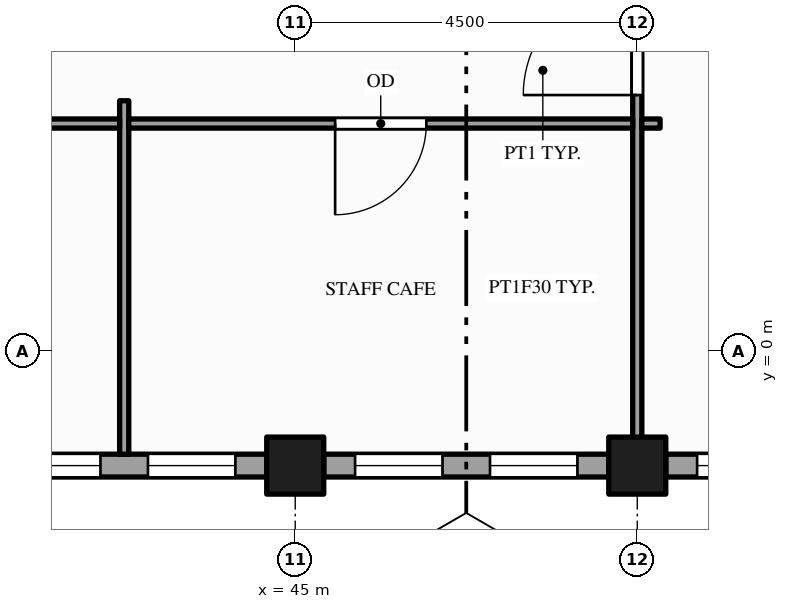
"""IFC4 building model, lengths in metres.
Left out: names, types, materials, properties, quantities, classifications, styles, units other than length and angle.
Written with IfcOpenShell. Run it as: python <this file> out.ifc"""

import sys

from ifc_helpers import new_model, si_unit, direction, frame, frame_2d, origin, origin_2d, place, context, subcontext, project, spatial, rectangle, hollow_rectangle, extrude, element, fill, save


model = new_model("IFC4")
c1 = context("Model", 3, precision=1e-05, world=origin(), true_north=direction((0.0, 1.0)))
c2 = subcontext(c1, "Body", "Model", "MODEL_VIEW")
j1 = project(units=[si_unit("LENGTHUNIT", "METRE"), si_unit("PLANEANGLEUNIT", "RADIAN")], contexts=[c1])
p1 = place(None, origin())
s1 = spatial("IfcSite", under=j1, at=p1, CompositionType="ELEMENT")
p2 = place(p1, origin())
s2 = spatial("IfcBuilding", under=s1, at=p2, CompositionType="ELEMENT")
p3 = place(p2, frame((0.0, 0.0, 215.0)))
s3 = spatial("IfcBuildingStorey", under=s2, at=p3, CompositionType="ELEMENT", Elevation=215.0)
for number, where, z_axis, x_axis in (
    (1, (45.0, -1.5, -0.15), (0.0, 0.0, 1.0), (1.0, 0.0, 0.0)),
    (2, (49.5, -1.5, -0.15), (0.0, 0.0, 1.0), (1.0, 0.0, 0.0)),
):
    element("IfcColumn", number, at=place(p3, frame(where, z_axis=z_axis, x_axis=x_axis)), inside=s3, PredefinedType="COLUMN", context=c2, shape_type="SweptSolid", body=[
        extrude(hollow_rectangle(XDim=0.75, YDim=0.75, WallThickness=0.036, at=origin_2d()), origin(), (0.0, 0.0, 1.0), 4.0),
    ])
p4 = place(p3, frame((40.875, -1.5, 0.0), z_axis=(0.0, 0.0, 1.0), x_axis=(1.0, 0.0, 0.0)))
e3 = element("IfcWall", 3, at=p4, inside=s3, PredefinedType="STANDARD", context=c2, shape_type="SweptSolid", body=[
    extrude(rectangle(XDim=3.75, YDim=0.3, at=frame_2d((1.875, 0.0))), origin(), (0.0, 0.0, 1.0), 2.87),
])
p5 = place(p4, frame((0.413, 0.0, 0.9)))
e4 = element("IfcOpeningElement", 4, at=p5, cuts=e3, PredefinedType="OPENING", context=c2, shape_type="SweptSolid", body=[
    extrude(rectangle(XDim=1.15, YDim=1.75, at=frame_2d((0.575, 0.875))), frame((0.0, 0.16, 0.0), z_axis=(0.0, -1.0, 0.0), x_axis=(1.0, 0.0, 0.0)), (0.0, 0.0, 1.0), 0.32),
])
p6 = place(p4, frame((2.188, 0.0, 0.9)))
e5 = element("IfcOpeningElement", 5, at=p6, cuts=e3, PredefinedType="OPENING", context=c2, shape_type="SweptSolid", body=[
    extrude(rectangle(XDim=1.15, YDim=1.75, at=frame_2d((0.575, 0.875))), frame((0.0, 0.16, 0.0), z_axis=(0.0, -1.0, 0.0), x_axis=(1.0, 0.0, 0.0)), (0.0, 0.0, 1.0), 0.32),
])
p7 = place(p3, frame((45.375, -1.5, 0.0), z_axis=(0.0, 0.0, 1.0), x_axis=(1.0, 0.0, 0.0)))
e6 = element("IfcWall", 6, at=p7, inside=s3, PredefinedType="STANDARD", context=c2, shape_type="SweptSolid", body=[
    extrude(rectangle(XDim=3.75, YDim=0.3, at=frame_2d((1.875, 0.0))), origin(), (0.0, 0.0, 1.0), 2.87),
])
p8 = place(p7, frame((0.413, 0.0, 0.9)))
e7 = element("IfcOpeningElement", 7, at=p8, cuts=e6, PredefinedType="OPENING", context=c2, shape_type="SweptSolid", body=[
    extrude(rectangle(XDim=1.15, YDim=1.75, at=frame_2d((0.575, 0.875))), frame((0.0, 0.16, 0.0), z_axis=(0.0, -1.0, 0.0), x_axis=(1.0, 0.0, 0.0)), (0.0, 0.0, 1.0), 0.32),
])
p9 = place(p7, frame((2.188, 0.0, 0.9)))
e8 = element("IfcOpeningElement", 8, at=p9, cuts=e6, PredefinedType="OPENING", context=c2, shape_type="SweptSolid", body=[
    extrude(rectangle(XDim=1.15, YDim=1.75, at=frame_2d((0.575, 0.875))), frame((0.0, 0.16, 0.0), z_axis=(0.0, -1.0, 0.0), x_axis=(1.0, 0.0, 0.0)), (0.0, 0.0, 1.0), 0.32),
])
p10 = place(p3, frame((49.875, -1.5, 0.0), z_axis=(0.0, 0.0, 1.0), x_axis=(1.0, 0.0, 0.0)))
e9 = element("IfcWall", 9, at=p10, inside=s3, PredefinedType="STANDARD", context=c2, shape_type="SweptSolid", body=[
    extrude(rectangle(XDim=3.75, YDim=0.3, at=frame_2d((1.875, 0.0))), origin(), (0.0, 0.0, 1.0), 2.87),
])
p11 = place(p10, frame((0.413, 0.0, 0.9)))
e10 = element("IfcOpeningElement", 10, at=p11, cuts=e9, PredefinedType="OPENING", context=c2, shape_type="SweptSolid", body=[
    extrude(rectangle(XDim=1.15, YDim=1.75, at=frame_2d((0.575, 0.875))), frame((0.0, 0.16, 0.0), z_axis=(0.0, -1.0, 0.0), x_axis=(1.0, 0.0, 0.0)), (0.0, 0.0, 1.0), 0.32),
])
p12 = place(p10, frame((2.188, 0.0, 0.9)))
e11 = element("IfcOpeningElement", 11, at=p12, cuts=e9, PredefinedType="OPENING", context=c2, shape_type="SweptSolid", body=[
    extrude(rectangle(XDim=1.15, YDim=1.75, at=frame_2d((0.575, 0.875))), frame((0.0, 0.16, 0.0), z_axis=(0.0, -1.0, 0.0), x_axis=(1.0, 0.0, 0.0)), (0.0, 0.0, 1.0), 0.32),
])
p13 = place(p3, frame((42.75, -1.35, 0.0), z_axis=(0.0, 0.0, 1.0), x_axis=(0.0, 1.0, 0.0)))
e12 = element("IfcWall", 12, at=p13, inside=s3, PredefinedType="PARTITIONING", context=c2, shape_type="SweptSolid", body=[
    extrude(rectangle(XDim=4.65, YDim=0.12, at=frame_2d((2.325, 0.0))), origin(), (0.0, 0.0, 1.0), 2.87),
])
p14 = place(p3, frame((49.5, -1.35, 0.0), z_axis=(0.0, 0.0, 1.0), x_axis=(0.0, 1.0, 0.0)))
e13 = element("IfcWall", 13, at=p14, inside=s3, PredefinedType="PARTITIONING", context=c2, shape_type="SweptSolid", body=[
    extrude(rectangle(XDim=22.2, YDim=0.12, at=frame_2d((11.1, 0.0))), origin(), (0.0, 0.0, 1.0), 2.87),
])
p15 = place(p14, frame((4.725, 0.0, 0.0)))
e14 = element("IfcOpeningElement", 14, at=p15, cuts=e13, PredefinedType="OPENING", context=c2, shape_type="SweptSolid", body=[
    extrude(rectangle(XDim=1.5, YDim=2.1, at=frame_2d((0.75, 1.05))), frame((0.0, 0.07, 0.0), z_axis=(0.0, -1.0, 0.0), x_axis=(1.0, 0.0, 0.0)), (0.0, 0.0, 1.0), 0.14),
])
p16 = place(p14, frame((15.975, 0.0, 0.0)))
e15 = element("IfcOpeningElement", 15, at=p16, cuts=e13, PredefinedType="OPENING", context=c2, shape_type="SweptSolid", body=[
    extrude(rectangle(XDim=1.5, YDim=2.1, at=frame_2d((0.75, 1.05))), frame((0.0, 0.07, 0.0), z_axis=(0.0, -1.0, 0.0), x_axis=(1.0, 0.0, 0.0)), (0.0, 0.0, 1.0), 0.14),
])
p17 = place(p14, frame((7.6, 0.0, 0.0)))
e16 = element("IfcOpeningElement", 16, at=p17, cuts=e13, PredefinedType="OPENING", context=c2, shape_type="SweptSolid", body=[
    extrude(rectangle(XDim=0.9, YDim=2.1, at=frame_2d((0.45, 1.05))), frame((0.0, 0.07, 0.0), z_axis=(0.0, -1.0, 0.0), x_axis=(1.0, 0.0, 0.0)), (0.0, 0.0, 1.0), 0.14),
])
p18 = place(p14, frame((10.65, 0.0, 0.0)))
e17 = element("IfcOpeningElement", 17, at=p18, cuts=e13, PredefinedType="OPENING", context=c2, shape_type="SweptSolid", body=[
    extrude(rectangle(XDim=0.9, YDim=2.1, at=frame_2d((0.45, 1.05))), frame((0.0, 0.07, 0.0), z_axis=(0.0, -1.0, 0.0), x_axis=(1.0, 0.0, 0.0)), (0.0, 0.0, 1.0), 0.14),
])
p19 = place(p14, frame((13.6, 0.0, 0.0)))
e18 = element("IfcOpeningElement", 18, at=p19, cuts=e13, PredefinedType="OPENING", context=c2, shape_type="SweptSolid", body=[
    extrude(rectangle(XDim=1.0, YDim=2.1, at=frame_2d((0.5, 1.05))), frame((0.0, 0.07, 0.0), z_axis=(0.0, -1.0, 0.0), x_axis=(1.0, 0.0, 0.0)), (0.0, 0.0, 1.0), 0.14),
])
p20 = place(p3, frame((38.31, 3.0, 0.0), z_axis=(0.0, 0.0, 1.0), x_axis=(1.0, 0.0, 0.0)))
e19 = element("IfcWall", 19, at=p20, inside=s3, PredefinedType="PARTITIONING", context=c2, shape_type="SweptSolid", body=[
    extrude(rectangle(XDim=4.38, YDim=0.12, at=frame_2d((2.19, 0.0))), origin(), (0.0, 0.0, 1.0), 2.87),
])
p21 = place(p20, frame((1.69, 0.0, 0.0)))
e20 = element("IfcOpeningElement", 20, at=p21, cuts=e19, PredefinedType="OPENING", context=c2, shape_type="SweptSolid", body=[
    extrude(rectangle(XDim=1.0, YDim=2.1, at=frame_2d((0.5, 1.05))), frame((0.0, 0.07, 0.0), z_axis=(0.0, -1.0, 0.0), x_axis=(1.0, 0.0, 0.0)), (0.0, 0.0, 1.0), 0.14),
])
p22 = place(p3, frame((42.81, 3.0, 0.0), z_axis=(0.0, 0.0, 1.0), x_axis=(1.0, 0.0, 0.0)))
e21 = element("IfcWall", 21, at=p22, inside=s3, PredefinedType="PARTITIONING", context=c2, shape_type="SweptSolid", body=[
    extrude(rectangle(XDim=6.63, YDim=0.12, at=frame_2d((3.315, 0.0))), origin(), (0.0, 0.0, 1.0), 2.87),
])
p23 = place(p22, frame((2.715, 0.0, 0.0)))
e22 = element("IfcOpeningElement", 22, at=p23, cuts=e21, PredefinedType="OPENING", context=c2, shape_type="SweptSolid", body=[
    extrude(rectangle(XDim=1.2, YDim=2.1, at=frame_2d((0.6, 1.05))), frame((0.0, 0.07, 0.0), z_axis=(0.0, -1.0, 0.0), x_axis=(1.0, 0.0, 0.0)), (0.0, 0.0, 1.0), 0.14),
])
p24 = place(p3, frame((49.56, 3.0, 0.0), z_axis=(0.0, 0.0, 1.0), x_axis=(1.0, 0.0, 0.0)))
e23 = element("IfcWall", 23, at=p24, inside=s3, PredefinedType="PARTITIONING", context=c2, shape_type="SweptSolid", body=[
    extrude(rectangle(XDim=0.24, YDim=0.12, at=frame_2d((0.12, 0.0))), origin(), (0.0, 0.0, 1.0), 2.87),
])
p25 = place(p5, origin())
e24 = element("IfcWindow", 24, at=p25, inside=s3, PartitioningType="SINGLE_PANEL", PredefinedType="WINDOW", context=c2, shape_type="SweptSolid", body=[
    extrude(rectangle(XDim=1.15, YDim=1.75, at=frame_2d((0.575, 0.875))), frame((0.0, 0.03, 0.0), z_axis=(0.0, -1.0, 0.0), x_axis=(1.0, 0.0, 0.0)), (0.0, 0.0, 1.0), 0.06),
])
fill(e4, e24)
p26 = place(p6, origin())
e25 = element("IfcWindow", 25, at=p26, inside=s3, PartitioningType="SINGLE_PANEL", PredefinedType="WINDOW", context=c2, shape_type="SweptSolid", body=[
    extrude(rectangle(XDim=1.15, YDim=1.75, at=frame_2d((0.575, 0.875))), frame((0.0, 0.03, 0.0), z_axis=(0.0, -1.0, 0.0), x_axis=(1.0, 0.0, 0.0)), (0.0, 0.0, 1.0), 0.06),
])
fill(e5, e25)
p27 = place(p8, origin())
e26 = element("IfcWindow", 26, at=p27, inside=s3, PartitioningType="SINGLE_PANEL", PredefinedType="WINDOW", context=c2, shape_type="SweptSolid", body=[
    extrude(rectangle(XDim=1.15, YDim=1.75, at=frame_2d((0.575, 0.875))), frame((0.0, 0.03, 0.0), z_axis=(0.0, -1.0, 0.0), x_axis=(1.0, 0.0, 0.0)), (0.0, 0.0, 1.0), 0.06),
])
fill(e7, e26)
p28 = place(p9, origin())
e27 = element("IfcWindow", 27, at=p28, inside=s3, PartitioningType="SINGLE_PANEL", PredefinedType="WINDOW", context=c2, shape_type="SweptSolid", body=[
    extrude(rectangle(XDim=1.15, YDim=1.75, at=frame_2d((0.575, 0.875))), frame((0.0, 0.03, 0.0), z_axis=(0.0, -1.0, 0.0), x_axis=(1.0, 0.0, 0.0)), (0.0, 0.0, 1.0), 0.06),
])
fill(e8, e27)
p29 = place(p11, origin())
e28 = element("IfcWindow", 28, at=p29, inside=s3, PartitioningType="SINGLE_PANEL", PredefinedType="WINDOW", context=c2, shape_type="SweptSolid", body=[
    extrude(rectangle(XDim=1.15, YDim=1.75, at=frame_2d((0.575, 0.875))), frame((0.0, 0.03, 0.0), z_axis=(0.0, -1.0, 0.0), x_axis=(1.0, 0.0, 0.0)), (0.0, 0.0, 1.0), 0.06),
])
fill(e10, e28)
p30 = place(p15, origin())
e29 = element("IfcDoor", 29, at=p30, inside=s3, OperationType="SINGLE_SWING_LEFT", PredefinedType="DOOR", context=c2, shape_type="SweptSolid", body=[
    extrude(rectangle(XDim=1.5, YDim=2.1, at=frame_2d((0.75, 1.05))), frame((0.0, 0.025, 0.0), z_axis=(0.0, -1.0, 0.0), x_axis=(1.0, 0.0, 0.0)), (0.0, 0.0, 1.0), 0.05),
])
fill(e14, e29)
p31 = place(p23, origin())
e30 = element("IfcDoor", 30, at=p31, inside=s3, OperationType="SINGLE_SWING_LEFT", PredefinedType="DOOR", context=c2, shape_type="SweptSolid", body=[
    extrude(rectangle(XDim=1.2, YDim=2.1, at=frame_2d((0.6, 1.05))), frame((0.0, 0.025, 0.0), z_axis=(0.0, -1.0, 0.0), x_axis=(1.0, 0.0, 0.0)), (0.0, 0.0, 1.0), 0.05),
])
fill(e22, e30)
save(model, sys.argv[1])
